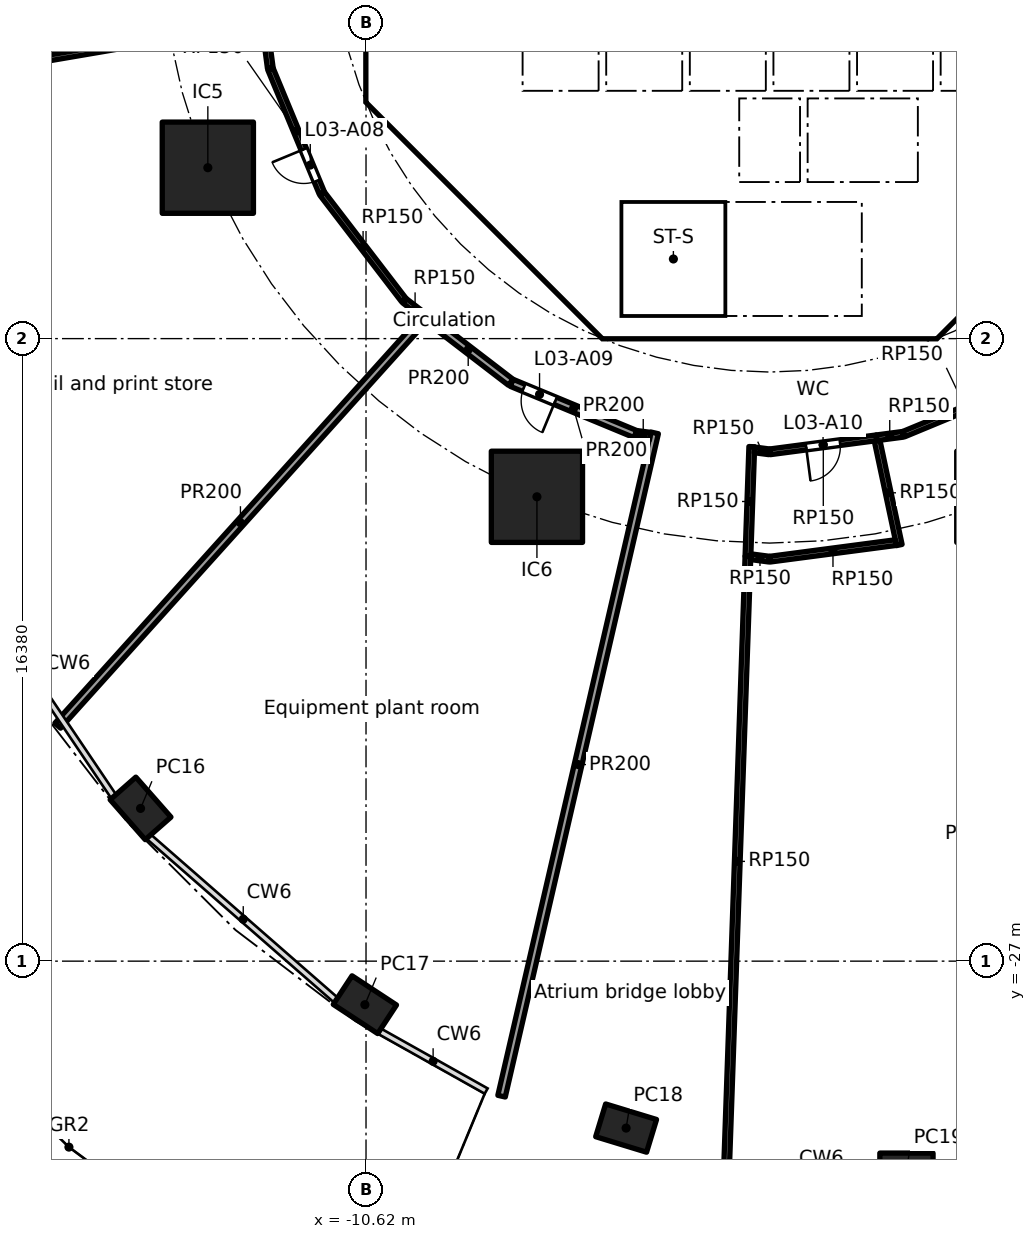
"""IFC4 building model, lengths in metres.
Left out: names, types, materials, properties, quantities, classifications, styles, units other than length and angle.
Written with IfcOpenShell. Run it as: python <this file> out.ifc"""

import sys

from ifc_helpers import new_model, si_unit, direction, frame, frame_2d, origin, origin_2d, place, context, subcontext, project, spatial, polyline, rectangle, hollow_rectangle, outline, extrude, element, fill, save


model = new_model("IFC4")
c1 = context("Model", 3, precision=1e-05, world=origin(), true_north=direction((0.0, 1.0)))
c2 = subcontext(c1, "Body", "Model", "MODEL_VIEW")
j1 = project(units=[si_unit("LENGTHUNIT", "METRE"), si_unit("PLANEANGLEUNIT", "RADIAN")], contexts=[c1])
p1 = place(None, origin())
s1 = spatial("IfcSite", under=j1, at=p1, CompositionType="ELEMENT")
p2 = place(p1, origin())
s2 = spatial("IfcBuilding", under=s1, at=p2, CompositionType="ELEMENT")
p3 = place(p2, frame((0.0, 0.0, 17.0)))
s3 = spatial("IfcBuildingStorey", under=s2, at=p3, CompositionType="ELEMENT", Elevation=17.0)
for number, where, z_axis, x_axis in (
    (1, (-16.552, -22.981, 0.0), (0.0, 0.0, 1.0), (0.66, -0.751, 0.0)),
    (2, (-10.65, -28.146, 0.0), (0.0, 0.0, 1.0), (0.836, -0.549, 0.0)),
    (3, (-3.776, -31.393, 0.0), (0.0, 0.0, 1.0), (0.957, -0.292, 0.0)),
    (4, (3.6, -32.5, 0.0), (0.0, 0.0, 1.0), (1.0, 0.0, 0.0)),
):
    element("IfcColumn", number, at=place(p3, frame(where, z_axis=z_axis, x_axis=x_axis)), inside=s3, PredefinedType="COLUMN", context=c2, shape_type="SweptSolid", body=[
        extrude(hollow_rectangle(XDim=1.4, YDim=0.9, WallThickness=0.05, at=origin_2d()), origin(), (0.0, 0.0, 1.0), 5.0),
    ])
for number, where, z_axis, x_axis in (
    (5, (-14.782, -6.123, 0.0), (0.0, 0.0, 1.0), (1.0, 0.0, 0.0)),
    (6, (-6.123, -14.782, 0.0), (0.0, 0.0, 1.0), (1.0, 0.0, 0.0)),
):
    element("IfcColumn", number, at=place(p3, frame(where, z_axis=z_axis, x_axis=x_axis)), inside=s3, PredefinedType="COLUMN", context=c2, shape_type="SweptSolid", body=[
        extrude(rectangle(XDim=2.4, YDim=2.4, at=origin_2d()), origin(), (0.0, 0.0, 1.0), 5.0),
    ])
p4 = place(p3, frame((-10.325, 3.801, 0.0), z_axis=(0.0, 0.0, 1.0), x_axis=(0.0, -1.0, 0.0)))
e7 = element("IfcWall", 7, at=p4, inside=s3, PredefinedType="SHEAR", context=c2, shape_type="SweptSolid", body=[
    extrude(rectangle(XDim=7.602, YDim=0.6, at=frame_2d((3.801, 0.0))), origin(), (0.0, 0.0, 1.0), 4.7),
])
p5 = place(p4, frame((0.651, 0.0, 0.0)))
e8 = element("IfcOpeningElement", 8, at=p5, cuts=e7, PredefinedType="OPENING", context=c2, shape_type="SweptSolid", body=[
    extrude(rectangle(XDim=1.5, YDim=2.1, at=frame_2d((0.75, 1.05))), frame((0.0, 0.31, 0.0), z_axis=(0.0, -1.0, 0.0), x_axis=(1.0, 0.0, 0.0)), (0.0, 0.0, 1.0), 0.62),
])
p6 = place(p4, frame((5.451, 0.0, 0.0)))
e9 = element("IfcOpeningElement", 9, at=p6, cuts=e7, PredefinedType="OPENING", context=c2, shape_type="SweptSolid", body=[
    extrude(rectangle(XDim=1.5, YDim=2.1, at=frame_2d((0.75, 1.05))), frame((0.0, 0.31, 0.0), z_axis=(0.0, -1.0, 0.0), x_axis=(1.0, 0.0, 0.0)), (0.0, 0.0, 1.0), 0.62),
])
p7 = place(p3, frame((-9.988, -4.613, 0.0), z_axis=(0.0, 0.0, 1.0), x_axis=(0.707106781187, -0.707106781187, 0.0)))
e10 = element("IfcWall", 10, at=p7, inside=s3, PredefinedType="SHEAR", context=c2, shape_type="SweptSolid", body=[
    extrude(rectangle(XDim=7.602, YDim=0.6, at=frame_2d((3.801, 0.0))), origin(), (0.0, 0.0, 1.0), 4.7),
])
p8 = place(p7, frame((6.151, 0.0, 0.0)))
e11 = element("IfcOpeningElement", 11, at=p8, cuts=e10, PredefinedType="OPENING", context=c2, shape_type="SweptSolid", body=[
    extrude(rectangle(XDim=1.1, YDim=2.1, at=frame_2d((0.55, 1.05))), frame((0.0, 0.31, 0.0), z_axis=(0.0, -1.0, 0.0), x_axis=(1.0, 0.0, 0.0)), (0.0, 0.0, 1.0), 0.62),
])
p9 = place(p3, frame((4.613, -9.988, 0.0), z_axis=(0.0, 0.0, 1.0), x_axis=(0.707106781187, 0.707106781187, 0.0)))
e12 = element("IfcWall", 12, at=p9, inside=s3, PredefinedType="SHEAR", context=c2, shape_type="SweptSolid", body=[
    extrude(rectangle(XDim=7.602, YDim=0.6, at=frame_2d((3.801, 0.0))), origin(), (0.0, 0.0, 1.0), 4.7),
])
p10 = place(p9, frame((3.201, 0.0, 0.0)))
e13 = element("IfcOpeningElement", 13, at=p10, cuts=e12, PredefinedType="OPENING", context=c2, shape_type="SweptSolid", body=[
    extrude(rectangle(XDim=1.2, YDim=2.1, at=frame_2d((0.6, 1.05))), frame((0.0, 0.31, 0.0), z_axis=(0.0, -1.0, 0.0), x_axis=(1.0, 0.0, 0.0)), (0.0, 0.0, 1.0), 0.62),
])
p11 = place(p3, frame((4.0, -10.025, 0.0), z_axis=(0.0, 0.0, 1.0), x_axis=(0.0, 1.0, 0.0)))
e14 = element("IfcWall", 14, at=p11, inside=s3, PredefinedType="SOLIDWALL", context=c2, shape_type="SweptSolid", body=[
    extrude(rectangle(XDim=3.0, YDim=0.2, at=frame_2d((1.5, 0.0))), origin(), (0.0, 0.0, 1.0), 4.7),
])
p12 = place(p11, frame((0.975, 0.0, 0.0)))
e15 = element("IfcOpeningElement", 15, at=p12, cuts=e14, PredefinedType="OPENING", context=c2, shape_type="SweptSolid", body=[
    extrude(rectangle(XDim=1.1, YDim=2.1, at=frame_2d((0.55, 1.05))), frame((0.0, 0.11, 0.0), z_axis=(0.0, -1.0, 0.0), x_axis=(1.0, 0.0, 0.0)), (0.0, 0.0, 1.0), 0.22),
])
p13 = place(p3, frame((-5.8, -8.227, 0.0), z_axis=(0.0, 0.0, 1.0), x_axis=(0.0, 1.0, 0.0)))
e16 = element("IfcWall", 16, at=p13, inside=s3, PredefinedType="PARTITIONING", context=c2, shape_type="SweptSolid", body=[
    extrude(rectangle(XDim=3.927, YDim=0.15, at=frame_2d((1.963, 0.0))), origin(), (0.0, 0.0, 1.0), 4.7),
])
p14 = place(p13, frame((1.476, 0.0, 0.0)))
e17 = element("IfcOpeningElement", 17, at=p14, cuts=e16, PredefinedType="OPENING", context=c2, shape_type="SweptSolid", body=[
    extrude(rectangle(XDim=0.9, YDim=2.1, at=frame_2d((0.45, 1.05))), frame((0.0, 0.085, 0.0), z_axis=(0.0, -1.0, 0.0), x_axis=(1.0, 0.0, 0.0)), (0.0, 0.0, 1.0), 0.17),
])
p15 = place(p3, frame((4.0, -6.5, 0.0), z_axis=(0.0, 0.0, 1.0), x_axis=(0.0, 1.0, 0.0)))
e18 = element("IfcWall", 18, at=p15, inside=s3, PredefinedType="SOLIDWALL", context=c2, shape_type="SweptSolid", body=[
    extrude(rectangle(XDim=2.2, YDim=0.2, at=frame_2d((1.1, 0.0))), origin(), (0.0, 0.0, 1.0), 4.7),
])
p16 = place(p15, frame((0.55, 0.0, 0.0)))
e19 = element("IfcOpeningElement", 19, at=p16, cuts=e18, PredefinedType="OPENING", context=c2, shape_type="SweptSolid", body=[
    extrude(rectangle(XDim=1.1, YDim=2.1, at=frame_2d((0.55, 1.05))), frame((0.0, 0.11, 0.0), z_axis=(0.0, -1.0, 0.0), x_axis=(1.0, 0.0, 0.0)), (0.0, 0.0, 1.0), 0.22),
])
p17 = place(p3, frame((-4.0, -6.5, 0.0), z_axis=(0.0, 0.0, 1.0), x_axis=(0.0, 1.0, 0.0)))
e20 = element("IfcWall", 20, at=p17, inside=s3, PredefinedType="SOLIDWALL", context=c2, shape_type="SweptSolid", body=[
    extrude(rectangle(XDim=2.2, YDim=0.2, at=frame_2d((1.1, 0.0))), origin(), (0.0, 0.0, 1.0), 4.7),
])
p18 = place(p17, frame((0.65, 0.0, 0.0)))
e21 = element("IfcOpeningElement", 21, at=p18, cuts=e20, PredefinedType="OPENING", context=c2, shape_type="SweptSolid", body=[
    extrude(rectangle(XDim=0.9, YDim=2.1, at=frame_2d((0.45, 1.05))), frame((0.0, 0.11, 0.0), z_axis=(0.0, -1.0, 0.0), x_axis=(1.0, 0.0, 0.0)), (0.0, 0.0, 1.0), 0.22),
])
p19 = place(p3, origin())
e22 = element("IfcWall", 22, at=p19, inside=s3, PredefinedType="SHEAR", context=c2, shape_type="SweptSolid", body=[
    extrude(outline(polyline([(-10.625, -3.801), (-10.025, -3.801), (-10.025, -4.152), (-9.776, -4.401), (-10.2, -4.825), (-10.625, -4.401), (-10.625, -3.801)])), origin(), (0.0, 0.0, 1.0), 4.7),
])
p20 = place(p3, origin())
e23 = element("IfcWall", 23, at=p20, inside=s3, PredefinedType="SHEAR", context=c2, shape_type="SweptSolid", body=[
    extrude(outline(polyline([(-4.152, -10.025), (4.152, -10.025), (4.401, -9.776), (4.825, -10.2), (4.401, -10.625), (-4.401, -10.625), (-4.825, -10.2), (-4.401, -9.776), (-4.152, -10.025)])), origin(), (0.0, 0.0, 1.0), 4.7),
])
for number, where, z_axis, x_axis in (
    (24, (-0.9, -6.5, 0.0), (0.0, 0.0, 1.0), (0.0, 1.0, 0.0)),
    (25, (0.9, -6.5, 0.0), (0.0, 0.0, 1.0), (0.0, 1.0, 0.0)),
):
    element("IfcWall", number, at=place(p3, frame(where, z_axis=z_axis, x_axis=x_axis)), inside=s3, PredefinedType="SOLIDWALL", context=c2, shape_type="SweptSolid", body=[
        extrude(rectangle(XDim=2.2, YDim=0.2, at=frame_2d((1.1, 0.0))), origin(), (0.0, 0.0, 1.0), 4.7),
    ])
p21 = place(p3, origin())
e26 = element("IfcWall", 26, at=p21, inside=s3, PredefinedType="SOLIDWALL", context=c2, shape_type="SweptSolid", body=[
    extrude(outline(polyline([(-6.7, -2.1), (-6.5, -2.1), (-6.5, -4.1), (-4.5, -4.1), (-4.5, -2.1), (-4.3, -2.1), (-4.3, -4.1), (-2.3, -4.1), (-2.3, -2.1), (-2.1, -2.1), (-2.1, -4.1), (-0.1, -4.1), (-0.1, -2.1), (0.1, -2.1), (0.1, -4.1), (2.1, -4.1), (2.1, -2.1), (2.3, -2.1), (2.3, -4.1), (4.3, -4.1), (4.3, -2.1), (4.5, -2.1), (4.5, -4.1), (6.5, -4.1), (6.5, -2.1), (6.7, -2.1), (6.7, -4.3), (-6.7, -4.3), (-6.7, -2.1)])), origin(), (0.0, 0.0, 1.0), 4.7),
])
p22 = place(p3, frame((-10.025, -4.0, 0.0), z_axis=(0.0, 0.0, 1.0), x_axis=(1.0, 0.0, 0.0)))
e27 = element("IfcWall", 27, at=p22, inside=s3, PredefinedType="PARTITIONING", context=c2, shape_type="SweptSolid", body=[
    extrude(rectangle(XDim=3.325, YDim=0.2, at=frame_2d((1.662, 0.0))), origin(), (0.0, 0.0, 1.0), 4.7),
])
p23 = place(p3, origin())
e28 = element("IfcWall", 28, at=p23, inside=s3, PredefinedType="SOLIDWALL", context=c2, shape_type="SweptSolid", body=[
    extrude(outline(polyline([(-3.9, -10.025), (-4.1, -10.025), (-4.1, -7.025), (-3.9, -7.025), (-3.9, -10.025)])), origin(), (0.0, 0.0, 1.0), 4.7),
])
p24 = place(p3, origin())
e29 = element("IfcWall", 29, at=p24, inside=s3, PredefinedType="SOLIDWALL", context=c2, shape_type="SweptSolid", body=[
    extrude(outline(polyline([(4.1, -7.025), (-4.1, -7.025), (-4.1, -6.5), (4.1, -6.5), (4.1, -7.025)])), origin(), (0.0, 0.0, 1.0), 4.7),
])
p25 = place(p3, frame((-13.375, -2.282, 0.0), z_axis=(0.0, 0.0, 1.0), x_axis=(-0.985753347153, -0.168197320361, 0.0)))
e30 = element("IfcWall", 30, at=p25, inside=s3, PredefinedType="PARTITIONING", context=c2, shape_type="SweptSolid", body=[
    extrude(rectangle(XDim=11.847, YDim=0.15, at=frame_2d((5.924, 0.0))), origin(), (0.0, 0.0, 1.0), 4.7),
])
p26 = place(p3, frame((-13.138, -3.508, 0.0), z_axis=(0.0, 0.0, 1.0), x_axis=(-0.130575867104, 0.991438320285, 0.0)))
e31 = element("IfcWall", 31, at=p26, inside=s3, PredefinedType="PARTITIONING", context=c2, shape_type="SweptSolid", body=[
    extrude(rectangle(XDim=1.249, YDim=0.15, at=frame_2d((0.625, 0.0))), origin(), (0.0, 0.0, 1.0), 4.7),
])
p27 = place(p3, frame((-11.782, -6.789, 0.0), z_axis=(0.0, 0.0, 1.0), x_axis=(-0.382677866108, 0.923881838111, 0.0)))
e32 = element("IfcWall", 32, at=p27, inside=s3, PredefinedType="PARTITIONING", context=c2, shape_type="SweptSolid", body=[
    extrude(rectangle(XDim=3.527, YDim=0.15, at=frame_2d((1.763, 0.0))), origin(), (0.0, 0.0, 1.0), 4.7),
])
p28 = place(p27, frame((0.346, 0.0, 0.0)))
e33 = element("IfcOpeningElement", 33, at=p28, cuts=e32, PredefinedType="OPENING", context=c2, shape_type="SweptSolid", body=[
    extrude(rectangle(XDim=0.9, YDim=2.1, at=frame_2d((0.45, 1.05))), frame((0.0, 0.085, 0.0), z_axis=(0.0, -1.0, 0.0), x_axis=(1.0, 0.0, 0.0)), (0.0, 0.0, 1.0), 0.17),
])
p29 = place(p3, frame((-9.624, -9.607, 0.0), z_axis=(0.0, 0.0, 1.0), x_axis=(-0.608736710054, 0.793372307201, 0.0)))
e34 = element("IfcWall", 34, at=p29, inside=s3, PredefinedType="PARTITIONING", context=c2, shape_type="SweptSolid", body=[
    extrude(rectangle(XDim=3.527, YDim=0.15, at=frame_2d((1.763, 0.0))), origin(), (0.0, 0.0, 1.0), 4.7),
])
p30 = place(p3, frame((-9.05, -10.051, 0.0), z_axis=(0.0, 0.0, 1.0), x_axis=(-0.793399175387, 0.608701690893, 0.0)))
e35 = element("IfcWall", 35, at=p30, inside=s3, PredefinedType="PARTITIONING", context=c2, shape_type="SweptSolid", body=[
    extrude(rectangle(XDim=0.702, YDim=0.15, at=frame_2d((0.351, 0.0))), origin(), (0.0, 0.0, 1.0), 4.7),
])
p31 = place(p3, frame((-0.571, -16.349, 0.0), z_axis=(0.0, 0.0, 1.0), x_axis=(-0.034915122528, -0.999390281231, 0.0)))
e36 = element("IfcWall", 36, at=p31, inside=s3, PredefinedType="PARTITIONING", context=c2, shape_type="SweptSolid", body=[
    extrude(rectangle(XDim=16.062, YDim=0.15, at=frame_2d((8.031, 0.0))), origin(), (0.0, 0.0, 1.0), 4.7),
])
p32 = place(p3, frame((-0.47, -13.462, 0.0), z_axis=(0.0, 0.0, 1.0), x_axis=(-0.034907670303, -0.999390541557, 0.0)))
e37 = element("IfcWall", 37, at=p32, inside=s3, PredefinedType="PARTITIONING", context=c2, shape_type="SweptSolid", body=[
    extrude(rectangle(XDim=2.888, YDim=0.15, at=frame_2d((1.444, 0.0))), origin(), (0.0, 0.0, 1.0), 4.7),
])
p33 = place(p3, frame((-0.012, -16.423, 0.0), z_axis=(0.0, 0.0, 1.0), x_axis=(-0.991457697021, 0.130428658731, 0.0)))
e38 = element("IfcWall", 38, at=p33, inside=s3, PredefinedType="PARTITIONING", context=c2, shape_type="SweptSolid", body=[
    extrude(rectangle(XDim=0.489, YDim=0.15, at=frame_2d((0.244, 0.0))), origin(), (0.0, 0.0, 1.0), 4.7),
])
p34 = place(p3, frame((-0.012, -13.598, 0.0), z_axis=(0.0, 0.0, 1.0), x_axis=(-0.991467089631, 0.130357240609, 0.0)))
e39 = element("IfcWall", 39, at=p34, inside=s3, PredefinedType="PARTITIONING", context=c2, shape_type="SweptSolid", body=[
    extrude(rectangle(XDim=0.39, YDim=0.15, at=frame_2d((0.195, 0.0))), origin(), (0.0, 0.0, 1.0), 4.7),
])
p35 = place(p3, frame((2.812, -13.23, 0.0), z_axis=(0.0, 0.0, 1.0), x_axis=(-0.991445467051, -0.130521591565, 0.0)))
e40 = element("IfcWall", 40, at=p35, inside=s3, PredefinedType="PARTITIONING", context=c2, shape_type="SweptSolid", body=[
    extrude(rectangle(XDim=2.824, YDim=0.15, at=frame_2d((1.412, 0.0))), origin(), (0.0, 0.0, 1.0), 4.7),
])
p36 = place(p35, frame((0.968, 0.0, 0.0)))
e41 = element("IfcOpeningElement", 41, at=p36, cuts=e40, PredefinedType="OPENING", context=c2, shape_type="SweptSolid", body=[
    extrude(rectangle(XDim=0.9, YDim=2.1, at=frame_2d((0.45, 1.05))), frame((0.0, 0.085, 0.0), z_axis=(0.0, -1.0, 0.0), x_axis=(1.0, 0.0, 0.0)), (0.0, 0.0, 1.0), 0.17),
])
p37 = place(p3, frame((2.828, -13.303, 0.0), z_axis=(0.0, 0.0, 1.0), x_axis=(0.207920091501, -0.978145815076, 0.0)))
e42 = element("IfcWall", 42, at=p37, inside=s3, PredefinedType="PARTITIONING", context=c2, shape_type="SweptSolid", body=[
    extrude(rectangle(XDim=2.809, YDim=0.15, at=frame_2d((1.404, 0.0))), origin(), (0.0, 0.0, 1.0), 4.7),
])
p38 = place(p3, frame((3.321, -15.987, 0.0), z_axis=(0.0, 0.0, 1.0), x_axis=(-0.991441844339, -0.130549106827, 0.0)))
e43 = element("IfcWall", 43, at=p38, inside=s3, PredefinedType="PARTITIONING", context=c2, shape_type="SweptSolid", body=[
    extrude(rectangle(XDim=3.338, YDim=0.15, at=frame_2d((1.669, 0.0))), origin(), (0.0, 0.0, 1.0), 4.7),
])
p39 = place(p3, frame((3.508, -13.138, 0.0), z_axis=(0.0, 0.0, 1.0), x_axis=(-0.991460212813, -0.130409533429, 0.0)))
e44 = element("IfcWall", 44, at=p39, inside=s3, PredefinedType="PARTITIONING", context=c2, shape_type="SweptSolid", body=[
    extrude(rectangle(XDim=0.702, YDim=0.15, at=frame_2d((0.351, 0.0))), origin(), (0.0, 0.0, 1.0), 4.7),
])
p40 = place(p3, frame((6.789, -11.782, 0.0), z_axis=(0.0, 0.0, 1.0), x_axis=(-0.923881838111, -0.382677866108, 0.0)))
e45 = element("IfcWall", 45, at=p40, inside=s3, PredefinedType="PARTITIONING", context=c2, shape_type="SweptSolid", body=[
    extrude(rectangle(XDim=3.527, YDim=0.15, at=frame_2d((1.763, 0.0))), origin(), (0.0, 0.0, 1.0), 4.7),
])
p41 = place(p40, frame((0.346, 0.0, 0.0)))
e46 = element("IfcOpeningElement", 46, at=p41, cuts=e45, PredefinedType="OPENING", context=c2, shape_type="SweptSolid", body=[
    extrude(rectangle(XDim=0.9, YDim=2.1, at=frame_2d((0.45, 1.05))), frame((0.0, 0.085, 0.0), z_axis=(0.0, -1.0, 0.0), x_axis=(1.0, 0.0, 0.0)), (0.0, 0.0, 1.0), 0.17),
])
p42 = place(p3, frame((-9.117, -10.126, 0.0), z_axis=(0.0, 0.0, 1.0), x_axis=(-0.669127133422, -0.743147952509, 0.0)))
e47 = element("IfcWall", 47, at=p42, inside=s3, PredefinedType="PARTITIONING", context=c2, shape_type="SweptSolid", body=[
    extrude(rectangle(XDim=14.367, YDim=0.2, at=frame_2d((7.184, 0.0))), origin(), (0.0, 0.0, 1.0), 4.7),
])
p43 = place(p3, frame((-7.053, -30.552, 0.0), z_axis=(0.0, 0.0, 1.0), x_axis=(0.224939147882, 0.974372813532, 0.0)))
e48 = element("IfcWall", 48, at=p43, inside=s3, PredefinedType="PARTITIONING", context=c2, shape_type="SweptSolid", body=[
    extrude(rectangle(XDim=17.911, YDim=0.2, at=frame_2d((8.955, 0.0))), origin(), (0.0, 0.0, 1.0), 4.7),
])
p44 = place(p3, frame((-6.812, -11.769, 0.0), z_axis=(0.0, 0.0, 1.0), x_axis=(-0.793389024662, 0.608714921409, 0.0)))
e49 = element("IfcWall", 49, at=p44, inside=s3, PredefinedType="PARTITIONING", context=c2, shape_type="SweptSolid", body=[
    extrude(rectangle(XDim=2.821, YDim=0.2, at=frame_2d((1.411, 0.0))), origin(), (0.0, 0.0, 1.0), 4.7),
])
p45 = place(p3, frame((-3.534, -13.131, 0.0), z_axis=(0.0, 0.0, 1.0), x_axis=(-0.92386297064, 0.382723413813, 0.0)))
e50 = element("IfcWall", 50, at=p45, inside=s3, PredefinedType="PARTITIONING", context=c2, shape_type="SweptSolid", body=[
    extrude(rectangle(XDim=3.52, YDim=0.2, at=frame_2d((1.76, 0.0))), origin(), (0.0, 0.0, 1.0), 4.7),
])
p46 = place(p45, frame((2.278, 0.0, 0.0)))
e51 = element("IfcOpeningElement", 51, at=p46, cuts=e50, PredefinedType="OPENING", context=c2, shape_type="SweptSolid", body=[
    extrude(rectangle(XDim=0.9, YDim=2.1, at=frame_2d((0.45, 1.05))), frame((0.0, 0.11, 0.0), z_axis=(0.0, -1.0, 0.0), x_axis=(1.0, 0.0, 0.0)), (0.0, 0.0, 1.0), 0.22),
])
p47 = place(p3, frame((-3.147, -13.186, 0.0), z_axis=(0.0, 0.0, 1.0), x_axis=(-0.991456595727, 0.130437029976, 0.0)))
e52 = element("IfcWall", 52, at=p47, inside=s3, PredefinedType="PARTITIONING", context=c2, shape_type="SweptSolid", body=[
    extrude(rectangle(XDim=0.361, YDim=0.2, at=frame_2d((0.181, 0.0))), origin(), (0.0, 0.0, 1.0), 4.7),
])
p48 = place(p16, origin())
e53 = element("IfcDoor", 53, at=p48, inside=s3, OperationType="DOUBLE_DOOR_SLIDING", PredefinedType="DOOR", context=c2, shape_type="SweptSolid", body=[
    extrude(rectangle(XDim=1.1, YDim=2.1, at=frame_2d((0.55, 1.05))), frame((0.0, 0.025, 0.0), z_axis=(0.0, -1.0, 0.0), x_axis=(1.0, 0.0, 0.0)), (0.0, 0.0, 1.0), 0.05),
])
fill(e19, e53)
p49 = place(p12, origin())
e54 = element("IfcDoor", 54, at=p49, inside=s3, OperationType="SINGLE_SWING_RIGHT", PredefinedType="DOOR", context=c2, shape_type="SweptSolid", body=[
    extrude(rectangle(XDim=1.1, YDim=2.1, at=frame_2d((0.55, 1.05))), frame((0.0, 0.025, 0.0), z_axis=(0.0, -1.0, 0.0), x_axis=(1.0, 0.0, 0.0)), (0.0, 0.0, 1.0), 0.05),
])
fill(e15, e54)
p50 = place(p14, origin())
e55 = element("IfcDoor", 55, at=p50, inside=s3, OperationType="SINGLE_SWING_RIGHT", PredefinedType="DOOR", context=c2, shape_type="SweptSolid", body=[
    extrude(rectangle(XDim=0.9, YDim=2.1, at=frame_2d((0.45, 1.05))), frame((0.0, 0.025, 0.0), z_axis=(0.0, -1.0, 0.0), x_axis=(1.0, 0.0, 0.0)), (0.0, 0.0, 1.0), 0.05),
])
fill(e17, e55)
p51 = place(p18, frame((0.9, 0.0, 0.0), x_axis=(-1.0, 0.0, 0.0)))
e56 = element("IfcDoor", 56, at=p51, inside=s3, OperationType="SINGLE_SWING_RIGHT", PredefinedType="DOOR", context=c2, shape_type="SweptSolid", body=[
    extrude(rectangle(XDim=0.9, YDim=2.1, at=frame_2d((0.45, 1.05))), frame((0.0, 0.025, 0.0), z_axis=(0.0, -1.0, 0.0), x_axis=(1.0, 0.0, 0.0)), (0.0, 0.0, 1.0), 0.05),
])
fill(e21, e56)
p52 = place(p6, origin())
e57 = element("IfcDoor", 57, at=p52, inside=s3, OperationType="DOUBLE_DOOR_SINGLE_SWING", PredefinedType="DOOR", context=c2, shape_type="SweptSolid", body=[
    extrude(rectangle(XDim=1.5, YDim=2.1, at=frame_2d((0.75, 1.05))), frame((0.0, 0.025, 0.0), z_axis=(0.0, -1.0, 0.0), x_axis=(1.0, 0.0, 0.0)), (0.0, 0.0, 1.0), 0.05),
])
fill(e9, e57)
p53 = place(p8, origin())
e58 = element("IfcDoor", 58, at=p53, inside=s3, OperationType="SINGLE_SWING_RIGHT", PredefinedType="DOOR", context=c2, shape_type="SweptSolid", body=[
    extrude(rectangle(XDim=1.1, YDim=2.1, at=frame_2d((0.55, 1.05))), frame((0.0, 0.025, 0.0), z_axis=(0.0, -1.0, 0.0), x_axis=(1.0, 0.0, 0.0)), (0.0, 0.0, 1.0), 0.05),
])
fill(e11, e58)
p54 = place(p28, origin())
e59 = element("IfcDoor", 59, at=p54, inside=s3, OperationType="SINGLE_SWING_RIGHT", PredefinedType="DOOR", context=c2, shape_type="SweptSolid", body=[
    extrude(rectangle(XDim=0.9, YDim=2.1, at=frame_2d((0.45, 1.05))), frame((0.0, 0.025, 0.0), z_axis=(0.0, -1.0, 0.0), x_axis=(1.0, 0.0, 0.0)), (0.0, 0.0, 1.0), 0.05),
])
fill(e33, e59)
p55 = place(p46, origin())
e60 = element("IfcDoor", 60, at=p55, inside=s3, OperationType="SINGLE_SWING_LEFT", PredefinedType="DOOR", context=c2, shape_type="SweptSolid", body=[
    extrude(rectangle(XDim=0.9, YDim=2.1, at=frame_2d((0.45, 1.05))), frame((0.0, 0.025, 0.0), z_axis=(0.0, -1.0, 0.0), x_axis=(1.0, 0.0, 0.0)), (0.0, 0.0, 1.0), 0.05),
])
fill(e51, e60)
p56 = place(p36, origin())
e61 = element("IfcDoor", 61, at=p56, inside=s3, OperationType="SINGLE_SWING_RIGHT", PredefinedType="DOOR", context=c2, shape_type="SweptSolid", body=[
    extrude(rectangle(XDim=0.9, YDim=2.1, at=frame_2d((0.45, 1.05))), frame((0.0, 0.025, 0.0), z_axis=(0.0, -1.0, 0.0), x_axis=(1.0, 0.0, 0.0)), (0.0, 0.0, 1.0), 0.05),
])
fill(e41, e61)
save(model, sys.argv[1])
